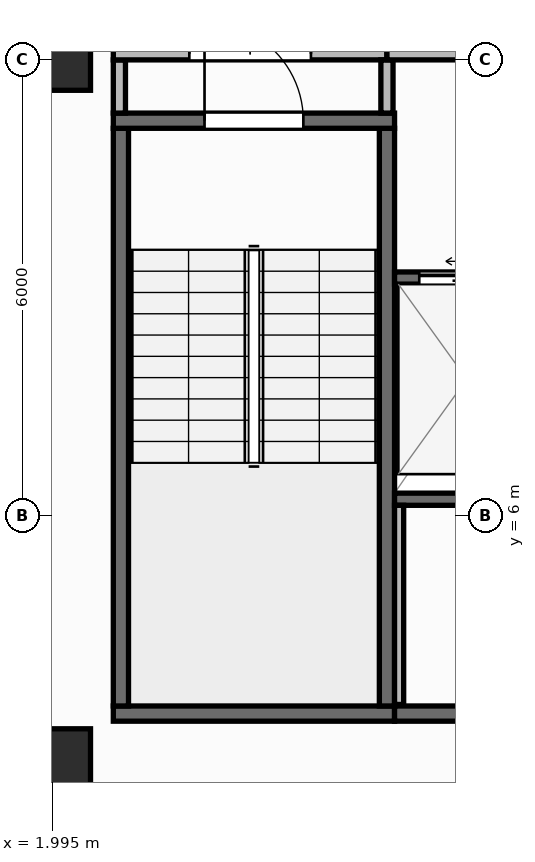
"""IFC4 building model, lengths in metres.
Left out: names, types, materials, properties, quantities, classifications, styles, units other than length and angle.
Written with IfcOpenShell. Run it as: python <this file> out.ifc"""

import sys

from ifc_helpers import new_model, si_unit, direction, frame, frame_2d, origin, origin_2d, place, context, subcontext, project, spatial, rectangle, extrude, element, fill, save


model = new_model("IFC4")
c1 = context("Model", 3, precision=1e-05, world=origin(), true_north=direction((0.0, 1.0)))
c2 = subcontext(c1, "Body", "Model", "MODEL_VIEW")
j1 = project(units=[si_unit("LENGTHUNIT", "METRE"), si_unit("PLANEANGLEUNIT", "RADIAN")], contexts=[c1])
p1 = place(None, origin())
s1 = spatial("IfcSite", under=j1, at=p1, CompositionType="ELEMENT")
p2 = place(p1, origin())
s2 = spatial("IfcBuilding", under=s1, at=p2, CompositionType="ELEMENT")
p3 = place(p2, frame((0.0, 0.0, 264.45)))
s3 = spatial("IfcBuildingStorey", under=s2, at=p3, CompositionType="ELEMENT", Elevation=264.45)
for number, where, z_axis, x_axis in (
    (1, (2.1, 2.8, 0.0), (0.0, 0.0, 1.0), (1.0, 0.0, 0.0)),
    (2, (2.1, 12.0, 0.0), (0.0, 0.0, 1.0), (1.0, 0.0, 0.0)),
):
    element("IfcColumn", number, at=place(p3, frame(where, z_axis=z_axis, x_axis=x_axis)), inside=s3, PredefinedType="COLUMN", context=c2, shape_type="SweptSolid", body=[
        extrude(rectangle(XDim=0.8, YDim=0.8, at=origin_2d()), origin(), (0.0, 0.0, 1.0), 3.95),
    ])
p4 = place(p3, frame((2.56, 0.173, 0.0), z_axis=(0.0, 0.0, 1.0), x_axis=(0.996798206282, 0.079958338856, 0.0)))
e3 = element("IfcWall", 3, at=p4, inside=s3, PredefinedType="STANDARD", context=c2, shape_type="SweptSolid", body=[
    extrude(rectangle(XDim=37.199, YDim=0.26, at=frame_2d((18.6, 0.0))), origin(), (0.0, 0.0, 1.0), 3.71),
])
p5 = place(p4, frame((17.4, 0.0, 0.9)))
e4 = element("IfcOpeningElement", 4, at=p5, cuts=e3, PredefinedType="OPENING", context=c2, shape_type="SweptSolid", body=[
    extrude(rectangle(XDim=2.4, YDim=1.65, at=frame_2d((1.2, 0.825))), frame((0.0, 0.14, 0.0), z_axis=(0.0, -1.0, 0.0), x_axis=(1.0, 0.0, 0.0)), (0.0, 0.0, 1.0), 0.28),
])
p6 = place(p3, frame((2.8, 3.4, 0.0), z_axis=(0.0, 0.0, 1.0), x_axis=(1.0, 0.0, 0.0)))
e5 = element("IfcWall", 5, at=p6, inside=s3, PredefinedType="SHEAR", context=c2, shape_type="SweptSolid", body=[
    extrude(rectangle(XDim=3.7, YDim=0.2, at=frame_2d((1.85, 0.0))), origin(), (0.0, 0.0, 1.0), 3.71),
])
for number, where, z_axis, x_axis in (
    (6, (2.9, 3.5, 0.0), (0.0, 0.0, 1.0), (0.0, 1.0, 0.0)),
    (7, (6.4, 3.5, 0.0), (0.0, 0.0, 1.0), (0.0, 1.0, 0.0)),
):
    element("IfcWall", number, at=place(p3, frame(where, z_axis=z_axis, x_axis=x_axis)), inside=s3, PredefinedType="SHEAR", context=c2, shape_type="SweptSolid", body=[
        extrude(rectangle(XDim=7.6, YDim=0.2, at=frame_2d((3.8, 0.0))), origin(), (0.0, 0.0, 1.0), 3.71),
    ])
p7 = place(p3, frame((2.8, 11.2, 0.0), z_axis=(0.0, 0.0, 1.0), x_axis=(1.0, 0.0, 0.0)))
e8 = element("IfcWall", 8, at=p7, inside=s3, PredefinedType="SHEAR", context=c2, shape_type="SweptSolid", body=[
    extrude(rectangle(XDim=3.7, YDim=0.2, at=frame_2d((1.85, 0.0))), origin(), (0.0, 0.0, 1.0), 3.71),
])
p8 = place(p7, frame((1.2, 0.0, 0.0)))
e9 = element("IfcOpeningElement", 9, at=p8, cuts=e8, PredefinedType="OPENING", context=c2, shape_type="SweptSolid", body=[
    extrude(rectangle(XDim=1.3, YDim=2.15, at=frame_2d((0.65, 1.075))), frame((0.0, 0.11, 0.0), z_axis=(0.0, -1.0, 0.0), x_axis=(1.0, 0.0, 0.0)), (0.0, 0.0, 1.0), 0.22),
])
p9 = place(p3, frame((6.5, 3.4, 0.0), z_axis=(0.0, 0.0, 1.0), x_axis=(1.0, 0.0, 0.0)))
e10 = element("IfcWall", 10, at=p9, inside=s3, PredefinedType="SHEAR", context=c2, shape_type="SweptSolid", body=[
    extrude(rectangle(XDim=13.7, YDim=0.2, at=frame_2d((6.85, 0.0))), origin(), (0.0, 0.0, 1.0), 3.71),
])
p10 = place(p3, frame((6.5, 6.22, 0.0), z_axis=(0.0, 0.0, 1.0), x_axis=(1.0, 0.0, 0.0)))
e11 = element("IfcWall", 11, at=p10, inside=s3, PredefinedType="SHEAR", context=c2, shape_type="SweptSolid", body=[
    extrude(rectangle(XDim=12.11, YDim=0.16, at=frame_2d((6.055, 0.0))), origin(), (0.0, 0.0, 1.0), 3.71),
])
p11 = place(p3, frame((6.5, 9.13, 0.0), z_axis=(0.0, 0.0, 1.0), x_axis=(1.0, 0.0, 0.0)))
e12 = element("IfcWall", 12, at=p11, inside=s3, PredefinedType="SHEAR", context=c2, shape_type="SweptSolid", body=[
    extrude(rectangle(XDim=1.975, YDim=0.16, at=frame_2d((0.988, 0.0))), origin(), (0.0, 0.0, 1.0), 3.71),
])
p12 = place(p11, frame((0.325, 0.0, 0.0)))
e13 = element("IfcOpeningElement", 13, at=p12, cuts=e12, PredefinedType="OPENING", context=c2, shape_type="SweptSolid", body=[
    extrude(rectangle(XDim=1.25, YDim=2.15, at=frame_2d((0.625, 1.075))), frame((0.0, 0.09, 0.0), z_axis=(0.0, -1.0, 0.0), x_axis=(1.0, 0.0, 0.0)), (0.0, 0.0, 1.0), 0.18),
])
p13 = place(p3, frame((6.56, 3.52, 0.0), z_axis=(0.0, 0.0, 1.0), x_axis=(0.0, 1.0, 0.0)))
e14 = element("IfcWall", 14, at=p13, inside=s3, PredefinedType="PARTITIONING", context=c2, shape_type="SweptSolid", body=[
    extrude(rectangle(XDim=2.62, YDim=0.12, at=frame_2d((1.31, 0.0))), origin(), (0.0, 0.0, 1.0), 3.71),
])
p14 = place(p3, frame((2.88, 11.3, 0.0), z_axis=(0.0, 0.0, 1.0), x_axis=(0.0, 1.0, 0.0)))
e15 = element("IfcWall", 15, at=p14, inside=s3, PredefinedType="PARTITIONING", context=c2, shape_type="SweptSolid", body=[
    extrude(rectangle(XDim=0.7, YDim=0.16, at=frame_2d((0.35, 0.0))), origin(), (0.0, 0.0, 1.0), 3.71),
])
p15 = place(p3, frame((2.8, 12.08, 0.0), z_axis=(0.0, 0.0, 1.0), x_axis=(1.0, 0.0, 0.0)))
e16 = element("IfcWall", 16, at=p15, inside=s3, PredefinedType="PARTITIONING", context=c2, shape_type="SweptSolid", body=[
    extrude(rectangle(XDim=3.6, YDim=0.16, at=frame_2d((1.8, 0.0))), origin(), (0.0, 0.0, 1.0), 3.157),
])
p16 = place(p15, frame((1.0, 0.0, 0.0)))
e17 = element("IfcOpeningElement", 17, at=p16, cuts=e16, PredefinedType="OPENING", context=c2, shape_type="SweptSolid", body=[
    extrude(rectangle(XDim=1.6, YDim=2.05, at=frame_2d((0.8, 1.025))), frame((0.0, 0.09, 0.0), z_axis=(0.0, -1.0, 0.0), x_axis=(1.0, 0.0, 0.0)), (0.0, 0.0, 1.0), 0.18),
])
p17 = place(p3, frame((6.4, 11.3, 0.0), z_axis=(0.0, 0.0, 1.0), x_axis=(0.0, 1.0, 0.0)))
e18 = element("IfcWall", 18, at=p17, inside=s3, PredefinedType="PARTITIONING", context=c2, shape_type="SweptSolid", body=[
    extrude(rectangle(XDim=0.7, YDim=0.16, at=frame_2d((0.35, 0.0))), origin(), (0.0, 0.0, 1.0), 3.71),
])
p18 = place(p3, frame((6.4, 12.08, 0.0), z_axis=(0.0, 0.0, 1.0), x_axis=(1.0, 0.0, 0.0)))
e19 = element("IfcWall", 19, at=p18, inside=s3, PredefinedType="PARTITIONING", context=c2, shape_type="SweptSolid", body=[
    extrude(rectangle(XDim=6.18, YDim=0.16, at=frame_2d((3.09, 0.0))), origin(), (0.0, 0.0, 1.0), 3.157),
])
p19 = place(p18, frame((2.29, 0.0, 0.0)))
e20 = element("IfcOpeningElement", 20, at=p19, cuts=e19, PredefinedType="OPENING", context=c2, shape_type="SweptSolid", body=[
    extrude(rectangle(XDim=1.6, YDim=2.05, at=frame_2d((0.8, 1.025))), frame((0.0, 0.09, 0.0), z_axis=(0.0, -1.0, 0.0), x_axis=(1.0, 0.0, 0.0)), (0.0, 0.0, 1.0), 0.18),
])
p20 = place(p8, origin())
e21 = element("IfcDoor", 21, at=p20, inside=s3, OperationType="SINGLE_SWING_LEFT", PredefinedType="DOOR", context=c2, shape_type="SweptSolid", body=[
    extrude(rectangle(XDim=1.3, YDim=2.15, at=frame_2d((0.65, 1.075))), frame((0.0, 0.025, 0.0), z_axis=(0.0, -1.0, 0.0), x_axis=(1.0, 0.0, 0.0)), (0.0, 0.0, 1.0), 0.05),
])
fill(e9, e21)
p21 = place(p12, origin())
e22 = element("IfcDoor", 22, at=p21, inside=s3, OperationType="SLIDING_TO_LEFT", PredefinedType="DOOR", context=c2, shape_type="SweptSolid", body=[
    extrude(rectangle(XDim=1.25, YDim=2.15, at=frame_2d((0.625, 1.075))), frame((0.0, 0.025, 0.0), z_axis=(0.0, -1.0, 0.0), x_axis=(1.0, 0.0, 0.0)), (0.0, 0.0, 1.0), 0.05),
])
fill(e13, e22)
p22 = place(p16, origin())
e23 = element("IfcDoor", 23, at=p22, inside=s3, OperationType="DOUBLE_DOOR_SINGLE_SWING", PredefinedType="DOOR", context=c2, shape_type="SweptSolid", body=[
    extrude(rectangle(XDim=1.6, YDim=2.05, at=frame_2d((0.8, 1.025))), frame((0.0, 0.025, 0.0), z_axis=(0.0, -1.0, 0.0), x_axis=(1.0, 0.0, 0.0)), (0.0, 0.0, 1.0), 0.05),
])
fill(e17, e23)
save(model, sys.argv[1])
